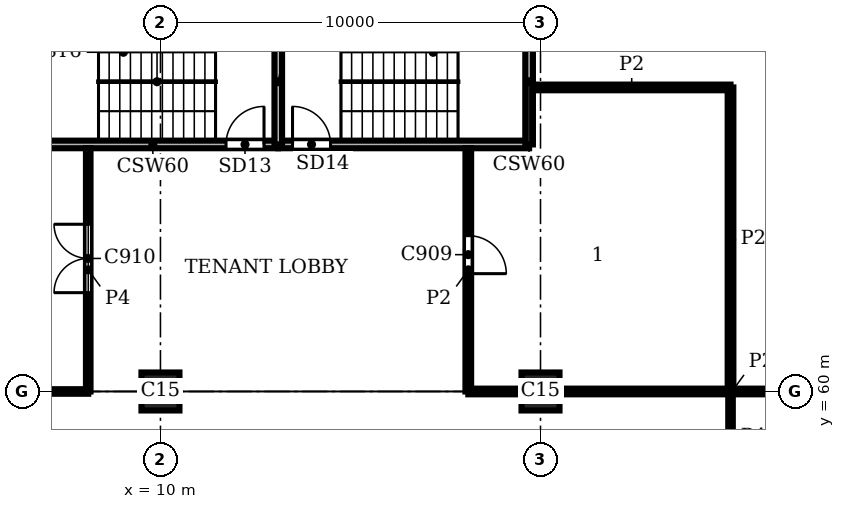
"""IFC4 building model, lengths in metres.
Left out: names, types, materials, properties, quantities, classifications, styles, units other than length and angle.
Written with IfcOpenShell. Run it as: python <this file> out.ifc"""

import sys

from ifc_helpers import new_model, si_unit, direction, frame, frame_2d, origin, origin_2d, place, context, subcontext, project, spatial, rectangle, extrude, element, fill, save


model = new_model("IFC4")
c1 = context("Model", 3, precision=1e-05, world=origin(), true_north=direction((0.0, 1.0)))
c2 = subcontext(c1, "Body", "Model", "MODEL_VIEW")
j1 = project(units=[si_unit("LENGTHUNIT", "METRE"), si_unit("PLANEANGLEUNIT", "RADIAN")], contexts=[c1])
p1 = place(None, origin())
s1 = spatial("IfcSite", under=j1, at=p1, CompositionType="ELEMENT")
p2 = place(p1, origin())
s2 = spatial("IfcBuilding", under=s1, at=p2, CompositionType="ELEMENT")
p3 = place(p2, frame((0.0, 0.0, 333.3)))
s3 = spatial("IfcBuildingStorey", under=s2, at=p3, CompositionType="ELEMENT", Elevation=333.3)
for number, where, z_axis, x_axis in (
    (1, (10.0, 60.0, 0.0), (0.0, 0.0, 1.0), (1.0, 0.0, 0.0)),
    (2, (20.0, 60.0, 0.0), (0.0, 0.0, 1.0), (1.0, 0.0, 0.0)),
):
    element("IfcColumn", number, at=place(p3, frame(where, z_axis=z_axis, x_axis=x_axis)), inside=s3, PredefinedType="COLUMN", context=c2, shape_type="SweptSolid", body=[
        extrude(rectangle(XDim=1.0, YDim=1.0, at=origin_2d()), origin(), (0.0, 0.0, 1.0), 3.9),
    ])
p4 = place(p3, frame((6.5, 66.5, 0.0), z_axis=(0.0, 0.0, 1.0), x_axis=(1.0, 0.0, 0.0)))
e3 = element("IfcWall", 3, at=p4, inside=s3, PredefinedType="SHEAR", context=c2, shape_type="SweptSolid", body=[
    extrude(rectangle(XDim=6.6, YDim=0.2, at=frame_2d((3.3, 0.0))), origin(), (0.0, 0.0, 1.0), 3.58),
])
p5 = place(p4, frame((5.225, 0.0, 0.0)))
e4 = element("IfcOpeningElement", 4, at=p5, cuts=e3, PredefinedType="OPENING", context=c2, shape_type="SweptSolid", body=[
    extrude(rectangle(XDim=1.0, YDim=2.1, at=frame_2d((0.5, 1.05))), frame((0.0, 0.11, 0.0), z_axis=(0.0, -1.0, 0.0), x_axis=(1.0, 0.0, 0.0)), (0.0, 0.0, 1.0), 0.22),
])
p6 = place(p3, frame((13.1, 66.5, 0.0), z_axis=(0.0, 0.0, 1.0), x_axis=(1.0, 0.0, 0.0)))
e5 = element("IfcWall", 5, at=p6, inside=s3, PredefinedType="SHEAR", context=c2, shape_type="SweptSolid", body=[
    extrude(rectangle(XDim=6.6, YDim=0.2, at=frame_2d((3.3, 0.0))), origin(), (0.0, 0.0, 1.0), 3.58),
])
p7 = place(p6, frame((0.375, 0.0, 0.0)))
e6 = element("IfcOpeningElement", 6, at=p7, cuts=e5, PredefinedType="OPENING", context=c2, shape_type="SweptSolid", body=[
    extrude(rectangle(XDim=1.0, YDim=2.1, at=frame_2d((0.5, 1.05))), frame((0.0, 0.11, 0.0), z_axis=(0.0, -1.0, 0.0), x_axis=(1.0, 0.0, 0.0)), (0.0, 0.0, 1.0), 0.22),
])
for number, where, z_axis, x_axis in (
    (7, (13.1, 66.5, 0.0), (0.0, 0.0, 1.0), (0.0, 1.0, 0.0)),
    (8, (19.7, 66.5, 0.0), (0.0, 0.0, 1.0), (0.0, 1.0, 0.0)),
):
    element("IfcWall", number, at=place(p3, frame(where, z_axis=z_axis, x_axis=x_axis)), inside=s3, PredefinedType="SHEAR", context=c2, shape_type="SweptSolid", body=[
        extrude(rectangle(XDim=3.3, YDim=0.2, at=frame_2d((1.65, 0.0))), origin(), (0.0, 0.0, 1.0), 3.58),
    ])
p8 = place(p3, frame((18.1, 60.0, 0.0), z_axis=(0.0, 0.0, 1.0), x_axis=(0.0, 1.0, 0.0)))
e9 = element("IfcWall", 9, at=p8, inside=s3, PredefinedType="PARTITIONING", context=c2, shape_type="SweptSolid", body=[
    extrude(rectangle(XDim=6.4, YDim=0.15, at=frame_2d((3.2, 0.0))), origin(), (0.0, 0.0, 1.0), 3.58),
])
p9 = place(p8, frame((3.1, 0.0, 0.0)))
e10 = element("IfcOpeningElement", 10, at=p9, cuts=e9, PredefinedType="OPENING", context=c2, shape_type="SweptSolid", body=[
    extrude(rectangle(XDim=1.0, YDim=2.1, at=frame_2d((0.5, 1.05))), frame((0.0, 0.085, 0.0), z_axis=(0.0, -1.0, 0.0), x_axis=(1.0, 0.0, 0.0)), (0.0, 0.0, 1.0), 0.17),
])
p10 = place(p3, frame((25.0, 60.0, 0.0), z_axis=(0.0, 0.0, 1.0), x_axis=(0.0, 1.0, 0.0)))
e11 = element("IfcWall", 11, at=p10, inside=s3, PredefinedType="PARTITIONING", context=c2, shape_type="SweptSolid", body=[
    extrude(rectangle(XDim=8.0, YDim=0.15, at=frame_2d((4.0, 0.0))), origin(), (0.0, 0.0, 1.0), 3.58),
])
p11 = place(p3, frame((18.1, 60.0, 0.0), z_axis=(0.0, 0.0, 1.0), x_axis=(1.0, 0.0, 0.0)))
e12 = element("IfcWall", 12, at=p11, inside=s3, PredefinedType="PARTITIONING", context=c2, shape_type="SweptSolid", body=[
    extrude(rectangle(XDim=1.4, YDim=0.15, at=frame_2d((0.7, 0.0))), origin(), (0.0, 0.0, 1.0), 3.58),
])
p12 = place(p3, frame((20.5, 60.0, 0.0), z_axis=(0.0, 0.0, 1.0), x_axis=(1.0, 0.0, 0.0)))
e13 = element("IfcWall", 13, at=p12, inside=s3, PredefinedType="PARTITIONING", context=c2, shape_type="SweptSolid", body=[
    extrude(rectangle(XDim=9.075, YDim=0.15, at=frame_2d((4.538, 0.0))), origin(), (0.0, 0.0, 1.0), 3.58),
])
p13 = place(p3, frame((19.8, 68.0, 0.0), z_axis=(0.0, 0.0, 1.0), x_axis=(1.0, 0.0, 0.0)))
e14 = element("IfcWall", 14, at=p13, inside=s3, PredefinedType="PARTITIONING", context=c2, shape_type="SweptSolid", body=[
    extrude(rectangle(XDim=5.2, YDim=0.15, at=frame_2d((2.6, 0.0))), origin(), (0.0, 0.0, 1.0), 3.58),
])
p14 = place(p3, frame((8.1, 60.0, 0.0), z_axis=(0.0, 0.0, 1.0), x_axis=(0.0, 1.0, 0.0)))
e15 = element("IfcWall", 15, at=p14, inside=s3, PredefinedType="PARTITIONING", context=c2, shape_type="SweptSolid", body=[
    extrude(rectangle(XDim=6.4, YDim=0.12, at=frame_2d((3.2, 0.0))), origin(), (0.0, 0.0, 1.0), 3.58),
])
p15 = place(p14, frame((2.6, 0.0, 0.0)))
e16 = element("IfcOpeningElement", 16, at=p15, cuts=e15, PredefinedType="OPENING", context=c2, shape_type="SweptSolid", body=[
    extrude(rectangle(XDim=1.8, YDim=2.1, at=frame_2d((0.9, 1.05))), frame((0.0, 0.07, 0.0), z_axis=(0.0, -1.0, 0.0), x_axis=(1.0, 0.0, 0.0)), (0.0, 0.0, 1.0), 0.14),
])
p16 = place(p3, frame((25.0, 57.6, 0.0), z_axis=(0.0, 0.0, 1.0), x_axis=(0.0, 1.0, 0.0)))
e17 = element("IfcWall", 17, at=p16, inside=s3, PredefinedType="PARTITIONING", context=c2, shape_type="SweptSolid", body=[
    extrude(rectangle(XDim=2.4, YDim=0.12, at=frame_2d((1.2, 0.0))), origin(), (0.0, 0.0, 1.0), 3.58),
])
p17 = place(p3, frame((5.0, 60.0, 0.0), z_axis=(0.0, 0.0, 1.0), x_axis=(1.0, 0.0, 0.0)))
e18 = element("IfcWall", 18, at=p17, inside=s3, PredefinedType="PARTITIONING", context=c2, shape_type="SweptSolid", body=[
    extrude(rectangle(XDim=3.1, YDim=0.12, at=frame_2d((1.55, 0.0))), origin(), (0.0, 0.0, 1.0), 3.58),
])
p18 = place(p5, origin())
e19 = element("IfcDoor", 19, at=p18, inside=s3, OperationType="SINGLE_SWING_RIGHT", PredefinedType="DOOR", context=c2, shape_type="SweptSolid", body=[
    extrude(rectangle(XDim=1.0, YDim=2.1, at=frame_2d((0.5, 1.05))), frame((0.0, 0.025, 0.0), z_axis=(0.0, -1.0, 0.0), x_axis=(1.0, 0.0, 0.0)), (0.0, 0.0, 1.0), 0.05),
])
fill(e4, e19)
p19 = place(p7, origin())
e20 = element("IfcDoor", 20, at=p19, inside=s3, OperationType="SINGLE_SWING_LEFT", PredefinedType="DOOR", context=c2, shape_type="SweptSolid", body=[
    extrude(rectangle(XDim=1.0, YDim=2.1, at=frame_2d((0.5, 1.05))), frame((0.0, 0.025, 0.0), z_axis=(0.0, -1.0, 0.0), x_axis=(1.0, 0.0, 0.0)), (0.0, 0.0, 1.0), 0.05),
])
fill(e6, e20)
p20 = place(p9, frame((1.0, 0.0, 0.0), z_axis=(0.0, 0.0, 1.0), x_axis=(-1.0, 0.0, 0.0)))
e21 = element("IfcDoor", 21, at=p20, inside=s3, OperationType="SINGLE_SWING_RIGHT", PredefinedType="DOOR", context=c2, shape_type="SweptSolid", body=[
    extrude(rectangle(XDim=1.0, YDim=2.1, at=frame_2d((0.5, 1.05))), frame((0.0, 0.025, 0.0), z_axis=(0.0, -1.0, 0.0), x_axis=(1.0, 0.0, 0.0)), (0.0, 0.0, 1.0), 0.05),
])
fill(e10, e21)
p21 = place(p15, origin())
e22 = element("IfcDoor", 22, at=p21, inside=s3, OperationType="DOUBLE_DOOR_SINGLE_SWING", PredefinedType="DOOR", context=c2, shape_type="SweptSolid", body=[
    extrude(rectangle(XDim=1.8, YDim=2.1, at=frame_2d((0.9, 1.05))), frame((0.0, 0.025, 0.0), z_axis=(0.0, -1.0, 0.0), x_axis=(1.0, 0.0, 0.0)), (0.0, 0.0, 1.0), 0.05),
])
fill(e16, e22)
save(model, sys.argv[1])
